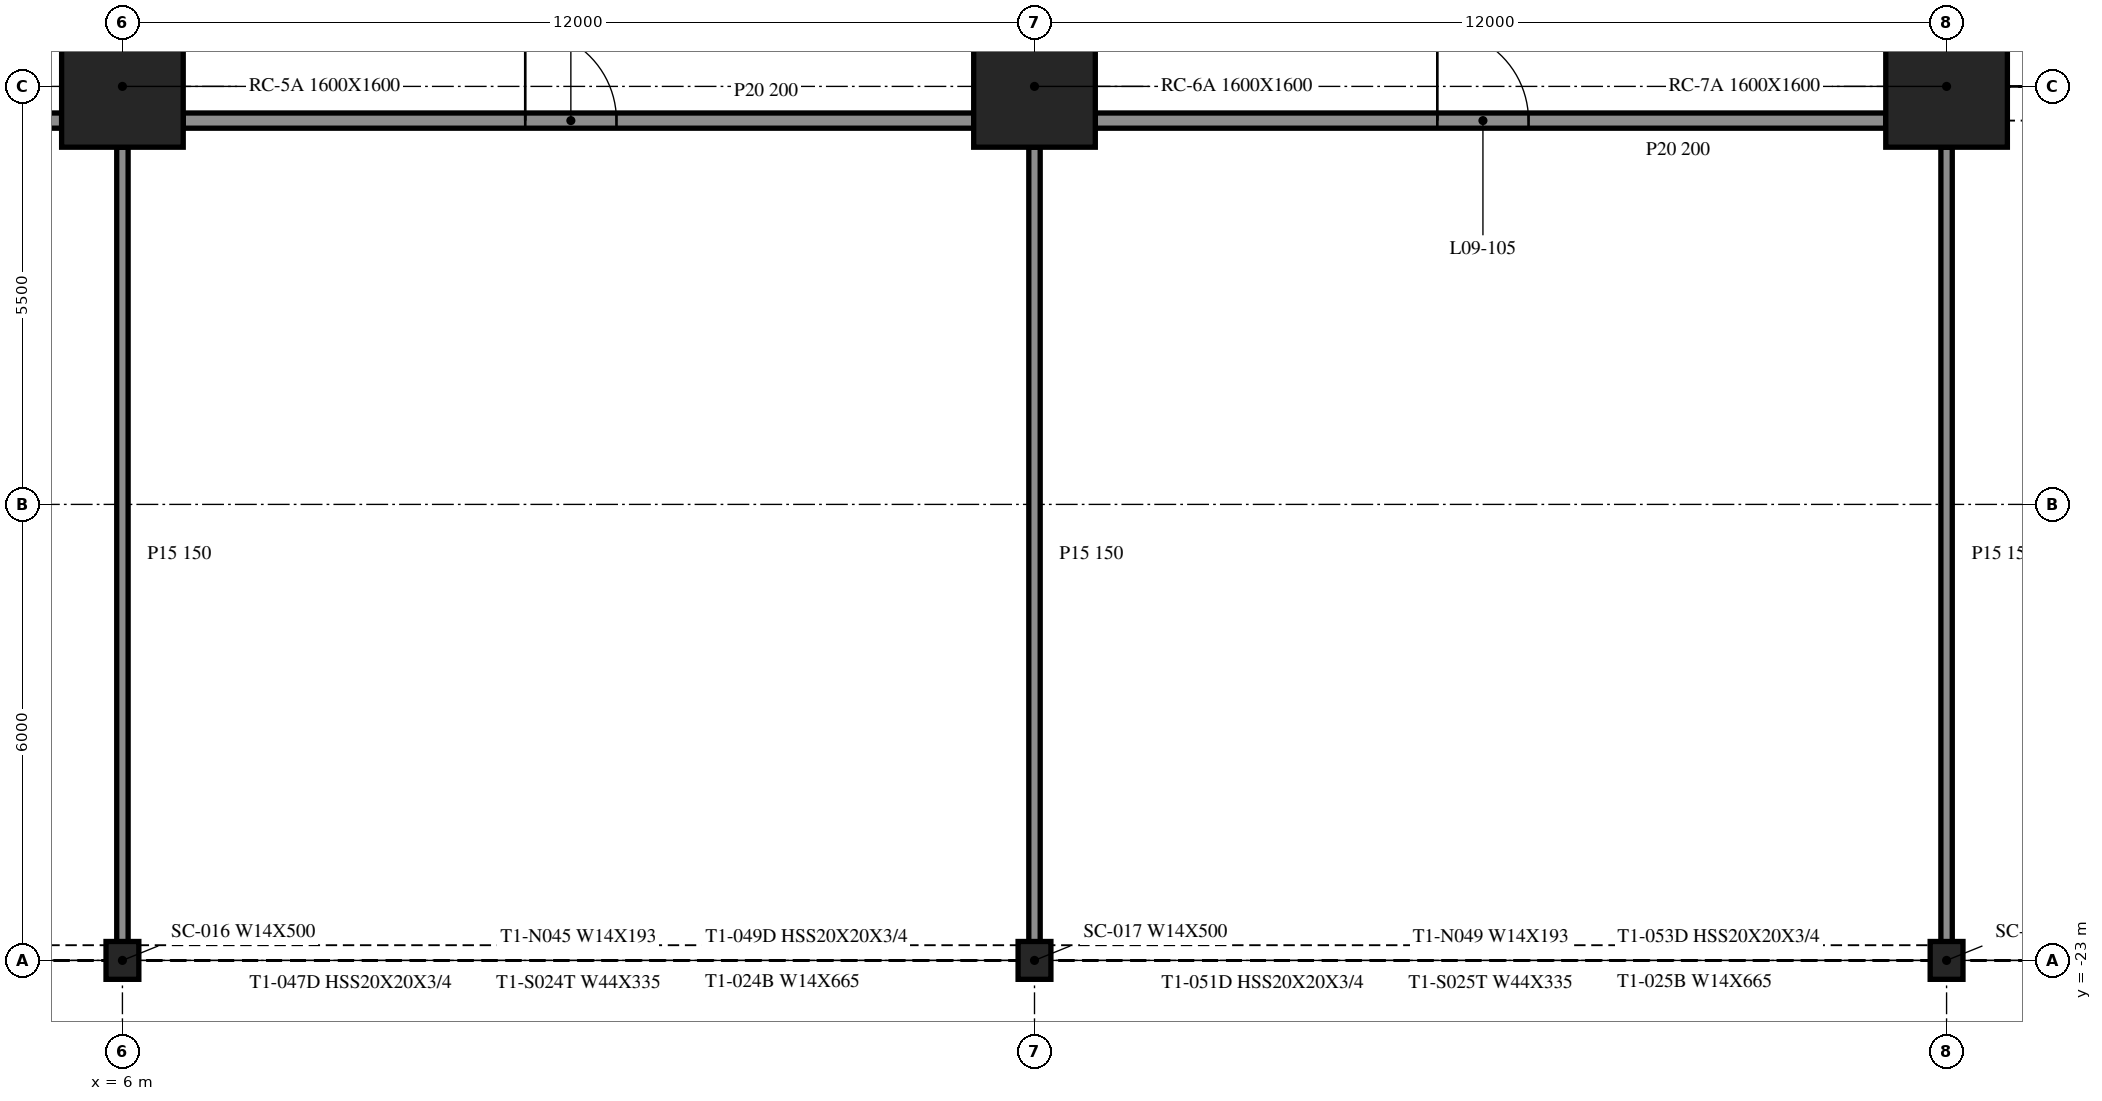
"""IFC4 building model, lengths in metres.
Left out: names, types, materials, properties, quantities, classifications, styles, units other than length and angle.
Written with IfcOpenShell. Run it as: python <this file> out.ifc"""

import sys

from ifc_helpers import new_model, si_unit, direction, frame, frame_2d, origin, origin_2d, place, context, subcontext, project, spatial, rectangle, i_section, extrude, element, fill, save


model = new_model("IFC4")
c1 = context("Model", 3, precision=1e-05, world=origin(), true_north=direction((0.0, 1.0)))
c2 = subcontext(c1, "Body", "Model", "MODEL_VIEW")
j1 = project(units=[si_unit("LENGTHUNIT", "METRE"), si_unit("PLANEANGLEUNIT", "RADIAN")], contexts=[c1])
p1 = place(None, origin())
s1 = spatial("IfcSite", under=j1, at=p1, CompositionType="ELEMENT")
p2 = place(p1, origin())
s2 = spatial("IfcBuilding", under=s1, at=p2, CompositionType="ELEMENT")
p3 = place(p2, frame((0.0, 0.0, 41.6)))
s3 = spatial("IfcBuildingStorey", under=s2, at=p3, CompositionType="ELEMENT", Elevation=41.6)
for number, where, z_axis, x_axis in (
    (1, (6.0, -11.5, -0.55), (0.0, 0.0, 1.0), (1.0, 0.0, 0.0)),
    (2, (18.0, -11.5, -0.55), (0.0, 0.0, 1.0), (1.0, 0.0, 0.0)),
    (3, (30.0, -11.5, -0.55), (0.0, 0.0, 1.0), (1.0, 0.0, 0.0)),
):
    element("IfcColumn", number, at=place(p3, frame(where, z_axis=z_axis, x_axis=x_axis)), inside=s3, PredefinedType="COLUMN", context=c2, shape_type="SweptSolid", body=[
        extrude(rectangle(XDim=1.6, YDim=1.6, at=origin_2d()), origin(), (0.0, 0.0, 1.0), 4.61),
    ])
for number, where, z_axis, x_axis in (
    (4, (6.0, -23.0, -0.55), (0.0, 0.0, 1.0), (1.0, 0.0, 0.0)),
    (5, (18.0, -23.0, -0.55), (0.0, 0.0, 1.0), (1.0, 0.0, 0.0)),
    (6, (30.0, -23.0, -0.55), (0.0, 0.0, 1.0), (1.0, 0.0, 0.0)),
):
    element("IfcColumn", number, at=place(p3, frame(where, z_axis=z_axis, x_axis=x_axis)), inside=s3, PredefinedType="COLUMN", context=c2, shape_type="SweptSolid", body=[
        extrude(i_section(OverallWidth=0.432, OverallDepth=0.498, WebThickness=0.056, FlangeThickness=0.089, at=origin_2d()), origin(), (0.0, 0.0, 1.0), 4.61),
    ])
p4 = place(p3, frame((-5.2, -11.95, 0.0), z_axis=(0.0, 0.0, 1.0), x_axis=(1.0, 0.0, 0.0)))
e7 = element("IfcWall", 7, at=p4, inside=s3, PredefinedType="PARTITIONING", context=c2, shape_type="SweptSolid", body=[
    extrude(rectangle(XDim=10.4, YDim=0.2, at=frame_2d((5.2, 0.0))), origin(), (0.0, 0.0, 1.0), 4.06),
])
p5 = place(p4, frame((4.7, 0.0, 0.0)))
e8 = element("IfcOpeningElement", 8, at=p5, cuts=e7, PredefinedType="OPENING", context=c2, shape_type="SweptSolid", body=[
    extrude(rectangle(XDim=0.9, YDim=2.1, at=frame_2d((0.45, 1.05))), frame((0.0, 0.11, 0.0), z_axis=(0.0, -1.0, 0.0), x_axis=(1.0, 0.0, 0.0)), (0.0, 0.0, 1.0), 0.22),
])
p6 = place(p3, frame((6.8, -11.95, 0.0), z_axis=(0.0, 0.0, 1.0), x_axis=(1.0, 0.0, 0.0)))
e9 = element("IfcWall", 9, at=p6, inside=s3, PredefinedType="PARTITIONING", context=c2, shape_type="SweptSolid", body=[
    extrude(rectangle(XDim=10.4, YDim=0.2, at=frame_2d((5.2, 0.0))), origin(), (0.0, 0.0, 1.0), 4.06),
])
p7 = place(p6, frame((4.5, 0.0, 0.0)))
e10 = element("IfcOpeningElement", 10, at=p7, cuts=e9, PredefinedType="OPENING", context=c2, shape_type="SweptSolid", body=[
    extrude(rectangle(XDim=1.2, YDim=2.1, at=frame_2d((0.6, 1.05))), frame((0.0, 0.11, 0.0), z_axis=(0.0, -1.0, 0.0), x_axis=(1.0, 0.0, 0.0)), (0.0, 0.0, 1.0), 0.22),
])
p8 = place(p3, frame((18.8, -11.95, 0.0), z_axis=(0.0, 0.0, 1.0), x_axis=(1.0, 0.0, 0.0)))
e11 = element("IfcWall", 11, at=p8, inside=s3, PredefinedType="PARTITIONING", context=c2, shape_type="SweptSolid", body=[
    extrude(rectangle(XDim=10.4, YDim=0.2, at=frame_2d((5.2, 0.0))), origin(), (0.0, 0.0, 1.0), 4.06),
])
p9 = place(p8, frame((4.5, 0.0, 0.0)))
e12 = element("IfcOpeningElement", 12, at=p9, cuts=e11, PredefinedType="OPENING", context=c2, shape_type="SweptSolid", body=[
    extrude(rectangle(XDim=1.2, YDim=2.1, at=frame_2d((0.6, 1.05))), frame((0.0, 0.11, 0.0), z_axis=(0.0, -1.0, 0.0), x_axis=(1.0, 0.0, 0.0)), (0.0, 0.0, 1.0), 0.22),
])
for number, where, z_axis, x_axis in (
    (13, (6.0, -23.0, 0.0), (0.0, 0.0, 1.0), (0.0, 1.0, 0.0)),
    (14, (18.0, -23.0, 0.0), (0.0, 0.0, 1.0), (0.0, 1.0, 0.0)),
    (15, (30.0, -23.0, 0.0), (0.0, 0.0, 1.0), (0.0, 1.0, 0.0)),
):
    element("IfcWall", number, at=place(p3, frame(where, z_axis=z_axis, x_axis=x_axis)), inside=s3, PredefinedType="PARTITIONING", context=c2, shape_type="SweptSolid", body=[
        extrude(rectangle(XDim=10.7, YDim=0.15, at=frame_2d((5.35, 0.0))), origin(), (0.0, 0.0, 1.0), 4.06),
    ])
p10 = place(p7, origin())
e16 = element("IfcDoor", 16, at=p10, inside=s3, OperationType="SINGLE_SWING_RIGHT", PredefinedType="DOOR", context=c2, shape_type="SweptSolid", body=[
    extrude(rectangle(XDim=1.2, YDim=2.1, at=frame_2d((0.6, 1.05))), frame((0.0, 0.025, 0.0), z_axis=(0.0, -1.0, 0.0), x_axis=(1.0, 0.0, 0.0)), (0.0, 0.0, 1.0), 0.05),
])
fill(e10, e16)
p11 = place(p9, origin())
e17 = element("IfcDoor", 17, at=p11, inside=s3, OperationType="SINGLE_SWING_RIGHT", PredefinedType="DOOR", context=c2, shape_type="SweptSolid", body=[
    extrude(rectangle(XDim=1.2, YDim=2.1, at=frame_2d((0.6, 1.05))), frame((0.0, 0.025, 0.0), z_axis=(0.0, -1.0, 0.0), x_axis=(1.0, 0.0, 0.0)), (0.0, 0.0, 1.0), 0.05),
])
fill(e12, e17)
save(model, sys.argv[1])
